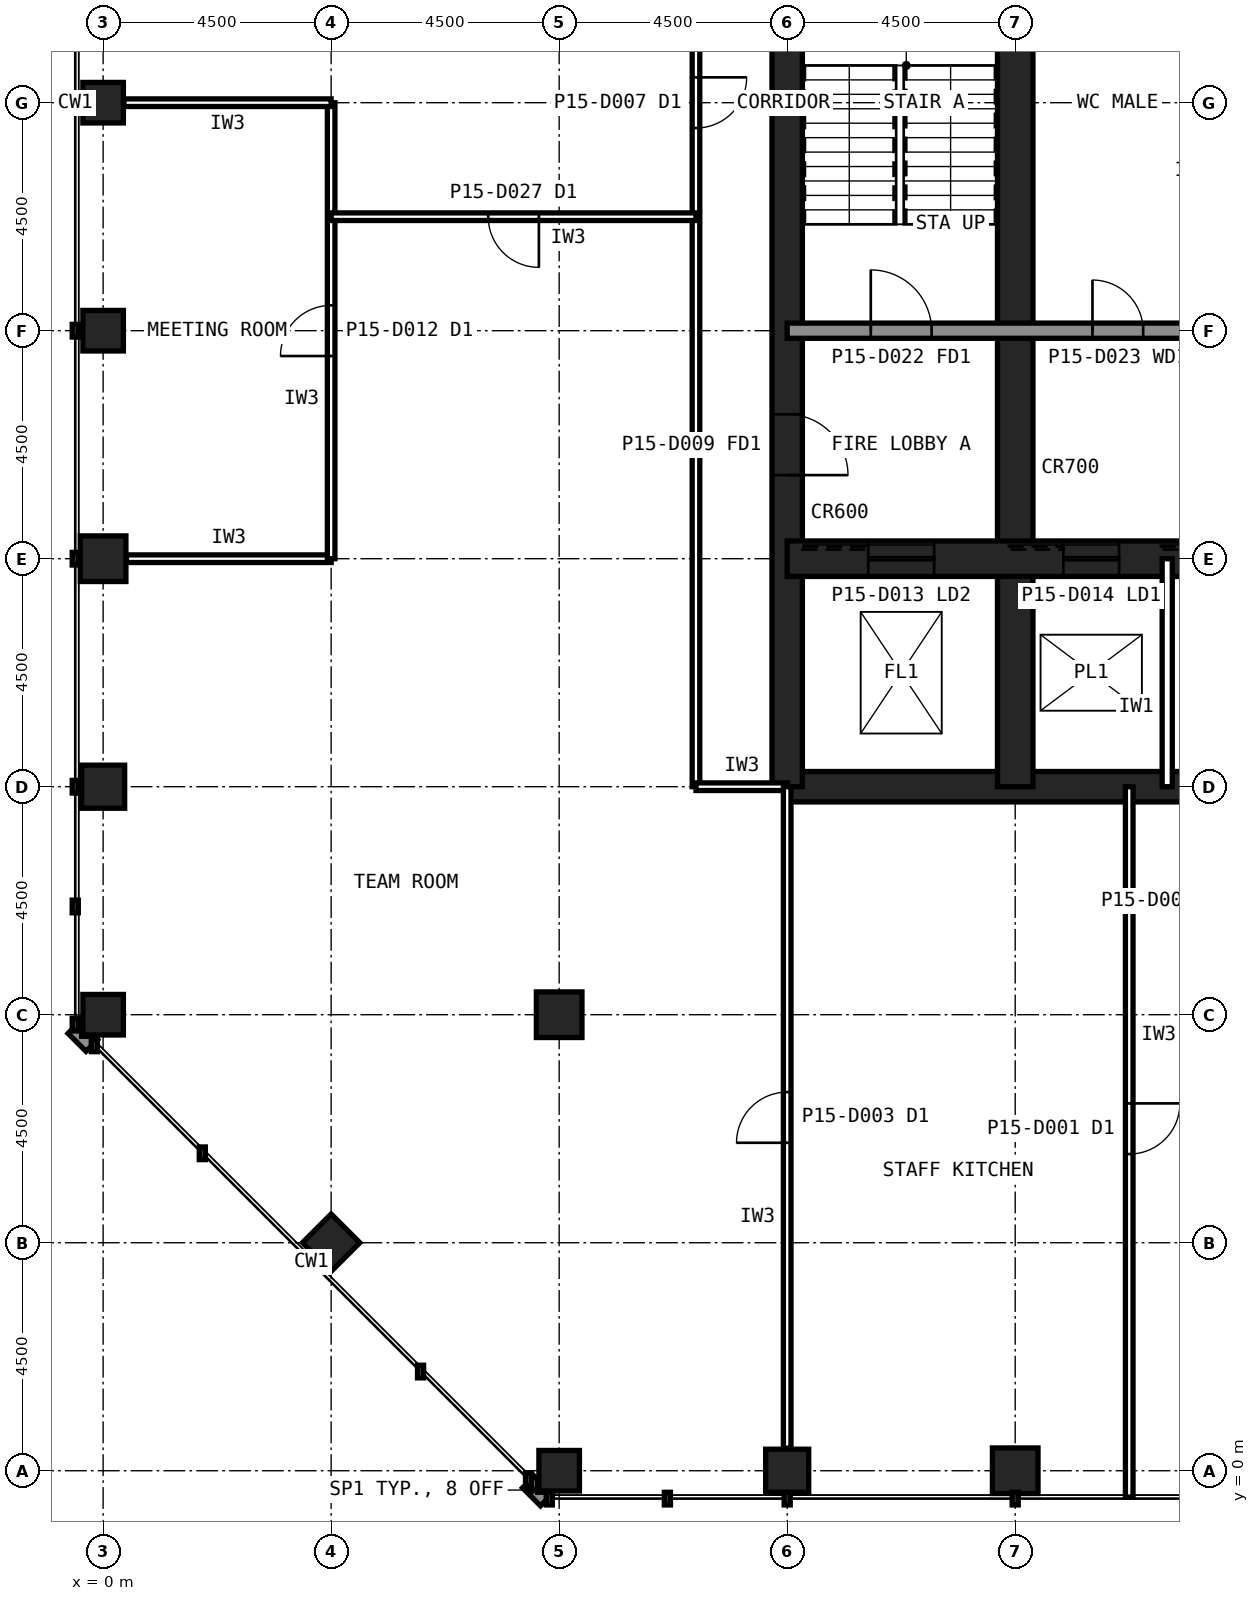
"""IFC4 building model, lengths in metres.
Left out: names, types, materials, properties, quantities, classifications, styles, units other than length and angle.
Written with IfcOpenShell. Run it as: python <this file> out.ifc"""

import sys

from ifc_helpers import new_model, si_unit, direction, frame, frame_2d, origin, origin_2d, place, context, subcontext, project, spatial, rectangle, hollow_rectangle, extrude, element, fill, save


model = new_model("IFC4")
c1 = context("Model", 3, precision=1e-05, world=origin(), true_north=direction((0.0, 1.0)))
c2 = subcontext(c1, "Body", "Model", "MODEL_VIEW")
j1 = project(units=[si_unit("LENGTHUNIT", "METRE"), si_unit("PLANEANGLEUNIT", "RADIAN")], contexts=[c1])
p1 = place(None, origin())
s1 = spatial("IfcSite", under=j1, at=p1, CompositionType="ELEMENT")
p2 = place(p1, origin())
s2 = spatial("IfcBuilding", under=s1, at=p2, CompositionType="ELEMENT")
p3 = place(p2, frame((0.0, 0.0, 62.6)))
s3 = spatial("IfcBuildingStorey", under=s2, at=p3, CompositionType="ELEMENT", Elevation=62.6)
p4 = place(p3, frame((9.0, 0.0, 0.0), z_axis=(0.0, 0.0, 1.0), x_axis=(1.0, 0.0, 0.0)))
e1 = element("IfcColumn", 1, at=p4, inside=s3, PredefinedType="COLUMN", context=c2, shape_type="SweptSolid", body=[
    extrude(hollow_rectangle(XDim=0.8, YDim=0.8, WallThickness=0.045, at=origin_2d()), origin(), (0.0, 0.0, 1.0), 4.2),
])
p5 = place(p3, frame((13.5, 0.0, 0.0), z_axis=(0.0, 0.0, 1.0), x_axis=(1.0, 0.0, 0.0)))
e2 = element("IfcColumn", 2, at=p5, inside=s3, PredefinedType="COLUMN", context=c2, shape_type="SweptSolid", body=[
    extrude(hollow_rectangle(XDim=0.85, YDim=0.85, WallThickness=0.05, at=origin_2d()), origin(), (0.0, 0.0, 1.0), 4.2),
])
p6 = place(p3, frame((18.0, 0.0, 0.0), z_axis=(0.0, 0.0, 1.0), x_axis=(1.0, 0.0, 0.0)))
e3 = element("IfcColumn", 3, at=p6, inside=s3, PredefinedType="COLUMN", context=c2, shape_type="SweptSolid", body=[
    extrude(hollow_rectangle(XDim=0.9, YDim=0.9, WallThickness=0.063, at=origin_2d()), origin(), (0.0, 0.0, 1.0), 4.2),
])
for number, where, z_axis, x_axis in (
    (4, (0.0, 27.0, 0.0), (0.0, 0.0, 1.0), (1.0, 0.0, 0.0)),
    (5, (0.0, 22.5, 0.0), (0.0, 0.0, 1.0), (1.0, 0.0, 0.0)),
):
    element("IfcColumn", number, at=place(p3, frame(where, z_axis=z_axis, x_axis=x_axis)), inside=s3, PredefinedType="COLUMN", context=c2, shape_type="SweptSolid", body=[
        extrude(hollow_rectangle(XDim=0.8, YDim=0.8, WallThickness=0.045, at=origin_2d()), origin(), (0.0, 0.0, 1.0), 4.2),
    ])
p7 = place(p3, frame((0.0, 18.0, 0.0), z_axis=(0.0, 0.0, 1.0), x_axis=(1.0, 0.0, 0.0)))
e6 = element("IfcColumn", 6, at=p7, inside=s3, PredefinedType="COLUMN", context=c2, shape_type="SweptSolid", body=[
    extrude(hollow_rectangle(XDim=0.9, YDim=0.9, WallThickness=0.063, at=origin_2d()), origin(), (0.0, 0.0, 1.0), 4.2),
])
p8 = place(p3, frame((0.0, 13.5, 0.0), z_axis=(0.0, 0.0, 1.0), x_axis=(1.0, 0.0, 0.0)))
e7 = element("IfcColumn", 7, at=p8, inside=s3, PredefinedType="COLUMN", context=c2, shape_type="SweptSolid", body=[
    extrude(hollow_rectangle(XDim=0.85, YDim=0.85, WallThickness=0.05, at=origin_2d()), origin(), (0.0, 0.0, 1.0), 4.2),
])
for number, where, z_axis, x_axis in (
    (8, (0.0, 9.0, 0.0), (0.0, 0.0, 1.0), (1.0, 0.0, 0.0)),
    (9, (4.5, 4.5, 0.0), (0.0, 0.0, 1.0), (0.707, 0.707, 0.0)),
):
    element("IfcColumn", number, at=place(p3, frame(where, z_axis=z_axis, x_axis=x_axis)), inside=s3, PredefinedType="COLUMN", context=c2, shape_type="SweptSolid", body=[
        extrude(hollow_rectangle(XDim=0.8, YDim=0.8, WallThickness=0.045, at=origin_2d()), origin(), (0.0, 0.0, 1.0), 4.2),
    ])
p9 = place(p3, frame((9.0, 9.0, 0.0), z_axis=(0.0, 0.0, 1.0), x_axis=(1.0, 0.0, 0.0)))
e10 = element("IfcColumn", 10, at=p9, inside=s3, PredefinedType="COLUMN", context=c2, shape_type="SweptSolid", body=[
    extrude(hollow_rectangle(XDim=0.9, YDim=0.9, WallThickness=0.063, at=origin_2d()), origin(), (0.0, 0.0, 1.0), 4.2),
])
p10 = place(p3, frame((13.5, 13.5, 0.0), z_axis=(0.0, 0.0, 1.0), x_axis=(1.0, 0.0, 0.0)))
e11 = element("IfcWall", 11, at=p10, inside=s3, PredefinedType="SHEAR", context=c2, shape_type="SweptSolid", body=[
    extrude(rectangle(XDim=27.0, YDim=0.6, at=frame_2d((13.5, 0.0))), origin(), (0.0, 0.0, 1.0), 4.2),
])
p11 = place(p3, frame((13.5, 40.5, 0.0), z_axis=(0.0, 0.0, 1.0), x_axis=(0.0, -1.0, 0.0)))
e12 = element("IfcWall", 12, at=p11, inside=s3, PredefinedType="SHEAR", context=c2, shape_type="SweptSolid", body=[
    extrude(rectangle(XDim=27.0, YDim=0.6, at=frame_2d((13.5, 0.0))), origin(), (0.0, 0.0, 1.0), 4.2),
])
p12 = place(p11, frame((19.65, 0.0, 0.0)))
e13 = element("IfcOpeningElement", 13, at=p12, cuts=e12, PredefinedType="OPENING", context=c2, shape_type="SweptSolid", body=[
    extrude(rectangle(XDim=1.2, YDim=2.1, at=frame_2d((0.6, 1.05))), frame((0.0, 0.31, 0.0), z_axis=(0.0, -1.0, 0.0), x_axis=(1.0, 0.0, 0.0)), (0.0, 0.0, 1.0), 0.62),
])
p13 = place(p11, frame((5.85, 0.0, 0.0)))
e14 = element("IfcOpeningElement", 14, at=p13, cuts=e12, PredefinedType="OPENING", context=c2, shape_type="SweptSolid", body=[
    extrude(rectangle(XDim=1.8, YDim=2.1, at=frame_2d((0.9, 1.05))), frame((0.0, 0.31, 0.0), z_axis=(0.0, -1.0, 0.0), x_axis=(1.0, 0.0, 0.0)), (0.0, 0.0, 1.0), 0.62),
])
p14 = place(p3, frame((18.0, 13.5, 0.0), z_axis=(0.0, 0.0, 1.0), x_axis=(0.0, 1.0, 0.0)))
e15 = element("IfcWall", 15, at=p14, inside=s3, PredefinedType="SHEAR", context=c2, shape_type="SweptSolid", body=[
    extrude(rectangle(XDim=18.0, YDim=0.7, at=frame_2d((9.0, 0.0))), origin(), (0.0, 0.0, 1.0), 4.2),
])
p15 = place(p3, frame((13.5, 18.0, 0.0), z_axis=(0.0, 0.0, 1.0), x_axis=(1.0, 0.0, 0.0)))
e16 = element("IfcWall", 16, at=p15, inside=s3, PredefinedType="SHEAR", context=c2, shape_type="SweptSolid", body=[
    extrude(rectangle(XDim=27.0, YDim=0.7, at=frame_2d((13.5, 0.0))), origin(), (0.0, 0.0, 1.0), 4.2),
])
p16 = place(p15, frame((24.3, 0.0, 0.0)))
e17 = element("IfcOpeningElement", 17, at=p16, cuts=e16, PredefinedType="OPENING", context=c2, shape_type="SweptSolid", body=[
    extrude(rectangle(XDim=0.9, YDim=2.1, at=frame_2d((0.45, 1.05))), frame((0.0, 0.36, 0.0), z_axis=(0.0, -1.0, 0.0), x_axis=(1.0, 0.0, 0.0)), (0.0, 0.0, 1.0), 0.72),
])
p17 = place(p15, frame((5.45, 0.0, 0.0)))
e18 = element("IfcOpeningElement", 18, at=p17, cuts=e16, PredefinedType="OPENING", context=c2, shape_type="SweptSolid", body=[
    extrude(rectangle(XDim=1.1, YDim=2.1, at=frame_2d((0.55, 1.05))), frame((0.0, 0.36, 0.0), z_axis=(0.0, -1.0, 0.0), x_axis=(1.0, 0.0, 0.0)), (0.0, 0.0, 1.0), 0.72),
])
p18 = place(p15, frame((8.45, 0.0, 0.0)))
e19 = element("IfcOpeningElement", 19, at=p18, cuts=e16, PredefinedType="OPENING", context=c2, shape_type="SweptSolid", body=[
    extrude(rectangle(XDim=1.1, YDim=2.1, at=frame_2d((0.55, 1.05))), frame((0.0, 0.36, 0.0), z_axis=(0.0, -1.0, 0.0), x_axis=(1.0, 0.0, 0.0)), (0.0, 0.0, 1.0), 0.72),
])
p19 = place(p15, frame((11.45, 0.0, 0.0)))
e20 = element("IfcOpeningElement", 20, at=p19, cuts=e16, PredefinedType="OPENING", context=c2, shape_type="SweptSolid", body=[
    extrude(rectangle(XDim=1.1, YDim=2.1, at=frame_2d((0.55, 1.05))), frame((0.0, 0.36, 0.0), z_axis=(0.0, -1.0, 0.0), x_axis=(1.0, 0.0, 0.0)), (0.0, 0.0, 1.0), 0.72),
])
p20 = place(p15, frame((14.45, 0.0, 0.0)))
e21 = element("IfcOpeningElement", 21, at=p20, cuts=e16, PredefinedType="OPENING", context=c2, shape_type="SweptSolid", body=[
    extrude(rectangle(XDim=1.1, YDim=2.1, at=frame_2d((0.55, 1.05))), frame((0.0, 0.36, 0.0), z_axis=(0.0, -1.0, 0.0), x_axis=(1.0, 0.0, 0.0)), (0.0, 0.0, 1.0), 0.72),
])
p21 = place(p15, frame((17.45, 0.0, 0.0)))
e22 = element("IfcOpeningElement", 22, at=p21, cuts=e16, PredefinedType="OPENING", context=c2, shape_type="SweptSolid", body=[
    extrude(rectangle(XDim=1.1, YDim=2.1, at=frame_2d((0.55, 1.05))), frame((0.0, 0.36, 0.0), z_axis=(0.0, -1.0, 0.0), x_axis=(1.0, 0.0, 0.0)), (0.0, 0.0, 1.0), 0.72),
])
p22 = place(p15, frame((20.45, 0.0, 0.0)))
e23 = element("IfcOpeningElement", 23, at=p22, cuts=e16, PredefinedType="OPENING", context=c2, shape_type="SweptSolid", body=[
    extrude(rectangle(XDim=1.1, YDim=2.1, at=frame_2d((0.55, 1.05))), frame((0.0, 0.36, 0.0), z_axis=(0.0, -1.0, 0.0), x_axis=(1.0, 0.0, 0.0)), (0.0, 0.0, 1.0), 0.72),
])
p23 = place(p15, frame((1.6, 0.0, 0.0)))
e24 = element("IfcOpeningElement", 24, at=p23, cuts=e16, PredefinedType="OPENING", context=c2, shape_type="SweptSolid", body=[
    extrude(rectangle(XDim=1.3, YDim=2.2, at=frame_2d((0.65, 1.1))), frame((0.0, 0.36, 0.0), z_axis=(0.0, -1.0, 0.0), x_axis=(1.0, 0.0, 0.0)), (0.0, 0.0, 1.0), 0.72),
])
p24 = place(p3, frame((13.5, 22.5, 0.0), z_axis=(0.0, 0.0, 1.0), x_axis=(1.0, 0.0, 0.0)))
e25 = element("IfcWall", 25, at=p24, inside=s3, PredefinedType="SOLIDWALL", context=c2, shape_type="SweptSolid", body=[
    extrude(rectangle(XDim=27.0, YDim=0.3, at=frame_2d((13.5, 0.0))), origin(), (0.0, 0.0, 1.0), 4.04),
])
p25 = place(p24, frame((1.65, 0.0, 0.0)))
e26 = element("IfcOpeningElement", 26, at=p25, cuts=e25, PredefinedType="OPENING", context=c2, shape_type="SweptSolid", body=[
    extrude(rectangle(XDim=1.2, YDim=2.1, at=frame_2d((0.6, 1.05))), frame((0.0, 0.16, 0.0), z_axis=(0.0, -1.0, 0.0), x_axis=(1.0, 0.0, 0.0)), (0.0, 0.0, 1.0), 0.32),
])
p26 = place(p24, frame((6.025, 0.0, 0.0)))
e27 = element("IfcOpeningElement", 27, at=p26, cuts=e25, PredefinedType="OPENING", context=c2, shape_type="SweptSolid", body=[
    extrude(rectangle(XDim=1.0, YDim=2.1, at=frame_2d((0.5, 1.05))), frame((0.0, 0.16, 0.0), z_axis=(0.0, -1.0, 0.0), x_axis=(1.0, 0.0, 0.0)), (0.0, 0.0, 1.0), 0.32),
])
p27 = place(p24, frame((10.525, 0.0, 0.0)))
e28 = element("IfcOpeningElement", 28, at=p27, cuts=e25, PredefinedType="OPENING", context=c2, shape_type="SweptSolid", body=[
    extrude(rectangle(XDim=1.0, YDim=2.1, at=frame_2d((0.5, 1.05))), frame((0.0, 0.16, 0.0), z_axis=(0.0, -1.0, 0.0), x_axis=(1.0, 0.0, 0.0)), (0.0, 0.0, 1.0), 0.32),
])
p28 = place(p24, frame((19.75, 0.0, 0.0)))
e29 = element("IfcOpeningElement", 29, at=p28, cuts=e25, PredefinedType="OPENING", context=c2, shape_type="SweptSolid", body=[
    extrude(rectangle(XDim=1.0, YDim=2.1, at=frame_2d((0.5, 1.05))), frame((0.0, 0.16, 0.0), z_axis=(0.0, -1.0, 0.0), x_axis=(1.0, 0.0, 0.0)), (0.0, 0.0, 1.0), 0.32),
])
p29 = place(p24, frame((15.05, 0.0, 0.0)))
e30 = element("IfcOpeningElement", 30, at=p29, cuts=e25, PredefinedType="OPENING", context=c2, shape_type="SweptSolid", body=[
    extrude(rectangle(XDim=1.4, YDim=2.4, at=frame_2d((0.7, 1.2))), frame((0.0, 0.16, 0.0), z_axis=(0.0, -1.0, 0.0), x_axis=(1.0, 0.0, 0.0)), (0.0, 0.0, 1.0), 0.32),
])
p30 = place(p3, frame((21.0, 13.5, 0.0), z_axis=(0.0, 0.0, 1.0), x_axis=(0.0, 1.0, 0.0)))
e31 = element("IfcWall", 31, at=p30, inside=s3, PredefinedType="PARTITIONING", context=c2, shape_type="SweptSolid", body=[
    extrude(rectangle(XDim=4.5, YDim=0.2, at=frame_2d((2.25, 0.0))), origin(), (0.0, 0.0, 1.0), 4.04),
])
p31 = place(p3, frame((11.7, 40.5, 0.0), z_axis=(0.0, 0.0, 1.0), x_axis=(0.0, -1.0, 0.0)))
e32 = element("IfcWall", 32, at=p31, inside=s3, PredefinedType="PARTITIONING", context=c2, shape_type="SweptSolid", body=[
    extrude(rectangle(XDim=27.0, YDim=0.15, at=frame_2d((13.5, 0.0))), origin(), (0.0, 0.0, 1.0), 4.04),
])
p32 = place(p31, frame((13.0, 0.0, 0.0)))
e33 = element("IfcOpeningElement", 33, at=p32, cuts=e32, PredefinedType="OPENING", context=c2, shape_type="SweptSolid", body=[
    extrude(rectangle(XDim=1.0, YDim=2.1, at=frame_2d((0.5, 1.05))), frame((0.0, 0.085, 0.0), z_axis=(0.0, -1.0, 0.0), x_axis=(1.0, 0.0, 0.0)), (0.0, 0.0, 1.0), 0.17),
])
p33 = place(p3, frame((11.7, 13.5, 0.0), z_axis=(0.0, 0.0, 1.0), x_axis=(1.0, 0.0, 0.0)))
e34 = element("IfcWall", 34, at=p33, inside=s3, PredefinedType="PARTITIONING", context=c2, shape_type="SweptSolid", body=[
    extrude(rectangle(XDim=1.81, YDim=0.15, at=frame_2d((0.905, 0.0))), origin(), (0.0, 0.0, 1.0), 3.189),
])
p34 = place(p3, frame((0.46, 18.0, 0.0), z_axis=(0.0, 0.0, 1.0), x_axis=(1.0, 0.0, 0.0)))
e35 = element("IfcWall", 35, at=p34, inside=s3, PredefinedType="PARTITIONING", context=c2, shape_type="SweptSolid", body=[
    extrude(rectangle(XDim=4.04, YDim=0.15, at=frame_2d((2.02, 0.0))), origin(), (0.0, 0.0, 1.0), 3.189),
])
p35 = place(p3, frame((4.5, 18.0, 0.0), z_axis=(0.0, 0.0, 1.0), x_axis=(0.0, 1.0, 0.0)))
e36 = element("IfcWall", 36, at=p35, inside=s3, PredefinedType="PARTITIONING", context=c2, shape_type="SweptSolid", body=[
    extrude(rectangle(XDim=9.0, YDim=0.15, at=frame_2d((4.5, 0.0))), origin(), (0.0, 0.0, 1.0), 4.04),
])
p36 = place(p35, frame((4.0, 0.0, 0.0)))
e37 = element("IfcOpeningElement", 37, at=p36, cuts=e36, PredefinedType="OPENING", context=c2, shape_type="SweptSolid", body=[
    extrude(rectangle(XDim=1.0, YDim=2.1, at=frame_2d((0.5, 1.05))), frame((0.0, 0.085, 0.0), z_axis=(0.0, -1.0, 0.0), x_axis=(1.0, 0.0, 0.0)), (0.0, 0.0, 1.0), 0.17),
])
p37 = place(p3, frame((4.5, 27.0, 0.0), z_axis=(0.0, 0.0, 1.0), x_axis=(-1.0, 0.0, 0.0)))
e38 = element("IfcWall", 38, at=p37, inside=s3, PredefinedType="PARTITIONING", context=c2, shape_type="SweptSolid", body=[
    extrude(rectangle(XDim=4.09, YDim=0.15, at=frame_2d((2.045, 0.0))), origin(), (0.0, 0.0, 1.0), 3.189),
])
p38 = place(p3, frame((11.7, 24.75, 0.0), z_axis=(0.0, 0.0, 1.0), x_axis=(-1.0, 0.0, 0.0)))
e39 = element("IfcWall", 39, at=p38, inside=s3, PredefinedType="PARTITIONING", context=c2, shape_type="SweptSolid", body=[
    extrude(rectangle(XDim=7.2, YDim=0.15, at=frame_2d((3.6, 0.0))), origin(), (0.0, 0.0, 1.0), 4.04),
])
p39 = place(p38, frame((3.1, 0.0, 0.0)))
e40 = element("IfcOpeningElement", 40, at=p39, cuts=e39, PredefinedType="OPENING", context=c2, shape_type="SweptSolid", body=[
    extrude(rectangle(XDim=1.0, YDim=2.1, at=frame_2d((0.5, 1.05))), frame((0.0, 0.085, 0.0), z_axis=(0.0, -1.0, 0.0), x_axis=(1.0, 0.0, 0.0)), (0.0, 0.0, 1.0), 0.17),
])
p40 = place(p3, frame((20.25, 13.5, 0.0), z_axis=(0.0, 0.0, 1.0), x_axis=(0.0, -1.0, 0.0)))
e41 = element("IfcWall", 41, at=p40, inside=s3, PredefinedType="PARTITIONING", context=c2, shape_type="SweptSolid", body=[
    extrude(rectangle(XDim=14.02, YDim=0.15, at=frame_2d((7.01, 0.0))), origin(), (0.0, 0.0, 1.0), 4.04),
])
p41 = place(p40, frame((6.25, 0.0, 0.0)))
e42 = element("IfcOpeningElement", 42, at=p41, cuts=e41, PredefinedType="OPENING", context=c2, shape_type="SweptSolid", body=[
    extrude(rectangle(XDim=1.0, YDim=2.1, at=frame_2d((0.5, 1.05))), frame((0.0, 0.085, 0.0), z_axis=(0.0, -1.0, 0.0), x_axis=(1.0, 0.0, 0.0)), (0.0, 0.0, 1.0), 0.17),
])
p42 = place(p3, frame((13.5, 0.445, 0.0), z_axis=(0.0, 0.0, 1.0), x_axis=(0.0, 1.0, 0.0)))
e43 = element("IfcWall", 43, at=p42, inside=s3, PredefinedType="PARTITIONING", context=c2, shape_type="SweptSolid", body=[
    extrude(rectangle(XDim=13.055, YDim=0.15, at=frame_2d((6.527, 0.0))), origin(), (0.0, 0.0, 1.0), 3.189),
])
p43 = place(p42, frame((6.028, 0.0, 0.0)))
e44 = element("IfcOpeningElement", 44, at=p43, cuts=e43, PredefinedType="OPENING", context=c2, shape_type="SweptSolid", body=[
    extrude(rectangle(XDim=1.0, YDim=2.1, at=frame_2d((0.5, 1.05))), frame((0.0, 0.085, 0.0), z_axis=(0.0, -1.0, 0.0), x_axis=(1.0, 0.0, 0.0)), (0.0, 0.0, 1.0), 0.17),
])
p44 = place(p12, origin())
e45 = element("IfcDoor", 45, at=p44, inside=s3, OperationType="SINGLE_SWING_RIGHT", PredefinedType="DOOR", context=c2, shape_type="SweptSolid", body=[
    extrude(rectangle(XDim=1.2, YDim=2.1, at=frame_2d((0.6, 1.05))), frame((0.0, 0.025, 0.0), z_axis=(0.0, -1.0, 0.0), x_axis=(1.0, 0.0, 0.0)), (0.0, 0.0, 1.0), 0.05),
])
fill(e13, e45)
p45 = place(p25, origin())
e46 = element("IfcDoor", 46, at=p45, inside=s3, OperationType="SINGLE_SWING_LEFT", PredefinedType="DOOR", context=c2, shape_type="SweptSolid", body=[
    extrude(rectangle(XDim=1.2, YDim=2.1, at=frame_2d((0.6, 1.05))), frame((0.0, 0.025, 0.0), z_axis=(0.0, -1.0, 0.0), x_axis=(1.0, 0.0, 0.0)), (0.0, 0.0, 1.0), 0.05),
])
fill(e26, e46)
p46 = place(p26, origin())
e47 = element("IfcDoor", 47, at=p46, inside=s3, OperationType="SINGLE_SWING_LEFT", PredefinedType="DOOR", context=c2, shape_type="SweptSolid", body=[
    extrude(rectangle(XDim=1.0, YDim=2.1, at=frame_2d((0.5, 1.05))), frame((0.0, 0.025, 0.0), z_axis=(0.0, -1.0, 0.0), x_axis=(1.0, 0.0, 0.0)), (0.0, 0.0, 1.0), 0.05),
])
fill(e27, e47)
p47 = place(p17, origin())
e48 = element("IfcDoor", 48, at=p47, inside=s3, OperationType="SLIDING_TO_LEFT", PredefinedType="DOOR", context=c2, shape_type="SweptSolid", body=[
    extrude(rectangle(XDim=1.1, YDim=2.1, at=frame_2d((0.55, 1.05))), frame((0.0, 0.025, 0.0), z_axis=(0.0, -1.0, 0.0), x_axis=(1.0, 0.0, 0.0)), (0.0, 0.0, 1.0), 0.05),
])
fill(e18, e48)
p48 = place(p23, origin())
e49 = element("IfcDoor", 49, at=p48, inside=s3, OperationType="SLIDING_TO_LEFT", PredefinedType="DOOR", context=c2, shape_type="SweptSolid", body=[
    extrude(rectangle(XDim=1.3, YDim=2.2, at=frame_2d((0.65, 1.1))), frame((0.0, 0.025, 0.0), z_axis=(0.0, -1.0, 0.0), x_axis=(1.0, 0.0, 0.0)), (0.0, 0.0, 1.0), 0.05),
])
fill(e24, e49)
p49 = place(p32, origin())
e50 = element("IfcDoor", 50, at=p49, inside=s3, OperationType="SINGLE_SWING_LEFT", PredefinedType="DOOR", context=c2, shape_type="SweptSolid", body=[
    extrude(rectangle(XDim=1.0, YDim=2.1, at=frame_2d((0.5, 1.05))), frame((0.0, 0.025, 0.0), z_axis=(0.0, -1.0, 0.0), x_axis=(1.0, 0.0, 0.0)), (0.0, 0.0, 1.0), 0.05),
])
fill(e33, e50)
p50 = place(p36, origin())
e51 = element("IfcDoor", 51, at=p50, inside=s3, OperationType="SINGLE_SWING_LEFT", PredefinedType="DOOR", context=c2, shape_type="SweptSolid", body=[
    extrude(rectangle(XDim=1.0, YDim=2.1, at=frame_2d((0.5, 1.05))), frame((0.0, 0.025, 0.0), z_axis=(0.0, -1.0, 0.0), x_axis=(1.0, 0.0, 0.0)), (0.0, 0.0, 1.0), 0.05),
])
fill(e37, e51)
p51 = place(p39, origin())
e52 = element("IfcDoor", 52, at=p51, inside=s3, OperationType="SINGLE_SWING_LEFT", PredefinedType="DOOR", context=c2, shape_type="SweptSolid", body=[
    extrude(rectangle(XDim=1.0, YDim=2.1, at=frame_2d((0.5, 1.05))), frame((0.0, 0.025, 0.0), z_axis=(0.0, -1.0, 0.0), x_axis=(1.0, 0.0, 0.0)), (0.0, 0.0, 1.0), 0.05),
])
fill(e40, e52)
p52 = place(p41, origin())
e53 = element("IfcDoor", 53, at=p52, inside=s3, OperationType="SINGLE_SWING_LEFT", PredefinedType="DOOR", context=c2, shape_type="SweptSolid", body=[
    extrude(rectangle(XDim=1.0, YDim=2.1, at=frame_2d((0.5, 1.05))), frame((0.0, 0.025, 0.0), z_axis=(0.0, -1.0, 0.0), x_axis=(1.0, 0.0, 0.0)), (0.0, 0.0, 1.0), 0.05),
])
fill(e42, e53)
p53 = place(p43, origin())
e54 = element("IfcDoor", 54, at=p53, inside=s3, OperationType="SINGLE_SWING_LEFT", PredefinedType="DOOR", context=c2, shape_type="SweptSolid", body=[
    extrude(rectangle(XDim=1.0, YDim=2.1, at=frame_2d((0.5, 1.05))), frame((0.0, 0.025, 0.0), z_axis=(0.0, -1.0, 0.0), x_axis=(1.0, 0.0, 0.0)), (0.0, 0.0, 1.0), 0.05),
])
fill(e44, e54)
save(model, sys.argv[1])
